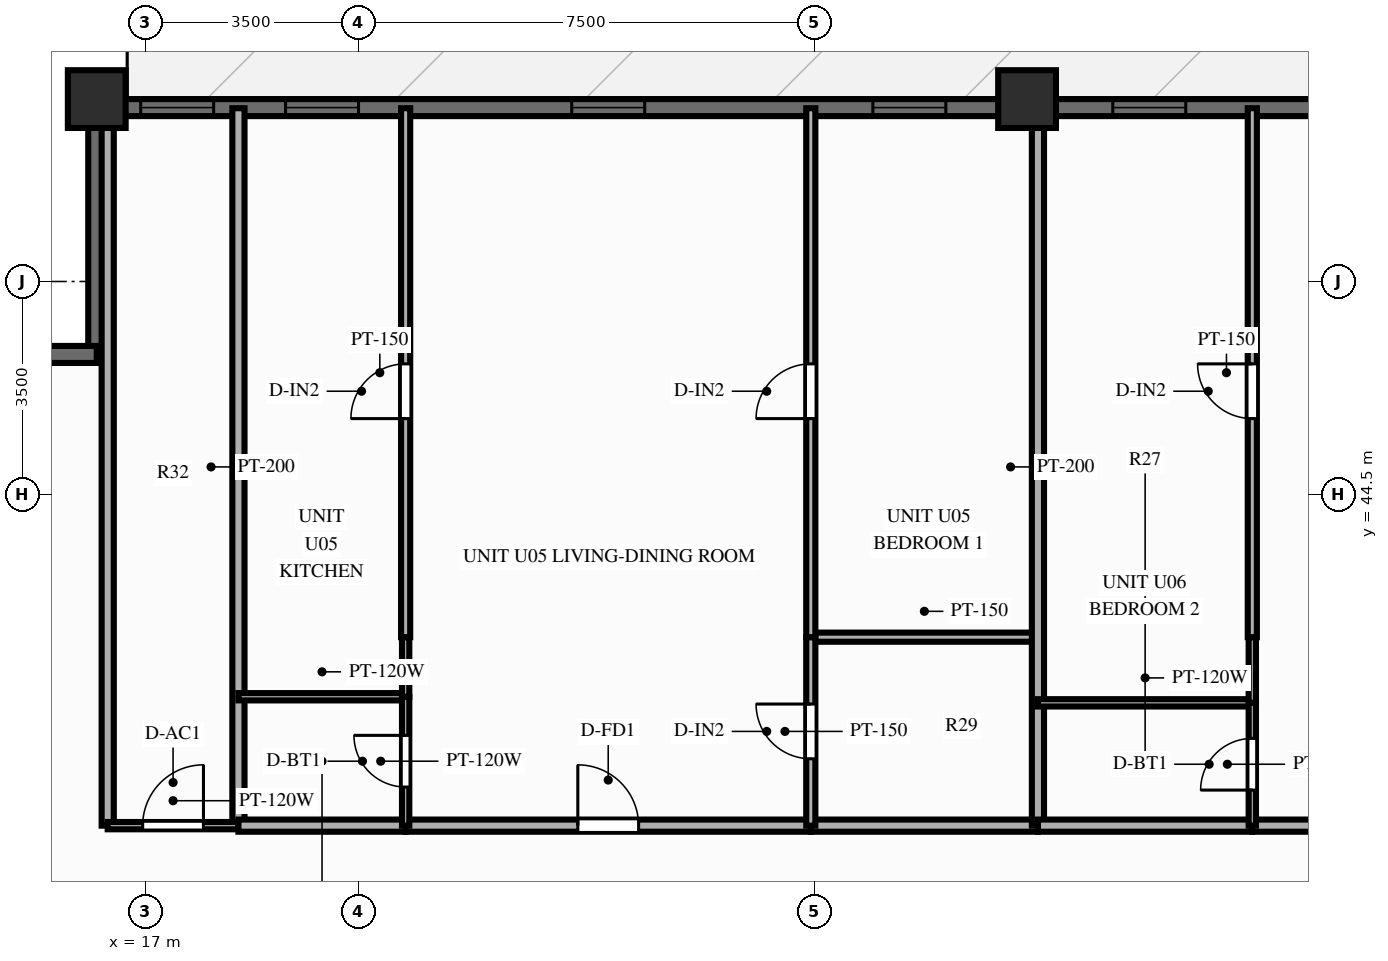
"""IFC4 building model, lengths in metres.
Left out: names, types, materials, properties, quantities, classifications, styles, units other than length and angle.
Written with IfcOpenShell. Run it as: python <this file> out.ifc"""

import sys

from ifc_helpers import new_model, si_unit, direction, frame, frame_2d, origin, origin_2d, place, context, subcontext, project, spatial, rectangle, extrude, source, transform, mapped, element, fill, save


model = new_model("IFC4")
c1 = context("Model", 3, precision=1e-05, world=origin(), true_north=direction((0.0, 1.0)))
c2 = subcontext(c1, "Body", "Model", "MODEL_VIEW")
j1 = project(units=[si_unit("LENGTHUNIT", "METRE"), si_unit("PLANEANGLEUNIT", "RADIAN")], contexts=[c1])
p1 = place(None, origin())
s1 = spatial("IfcSite", under=j1, at=p1, CompositionType="ELEMENT")
p2 = place(p1, origin())
s2 = spatial("IfcBuilding", under=s1, at=p2, CompositionType="ELEMENT")
p3 = place(p2, frame((0.0, 0.0, 77.85)))
s3 = spatial("IfcBuildingStorey", under=s2, at=p3, CompositionType="ELEMENT", Elevation=77.85)
m1 = source(origin(), c2, "Body", "SweptSolid", [
    extrude(rectangle(XDim=0.95, YDim=0.95, at=origin_2d()), origin(), (0.0, 0.0, 1.0), 3.0),
])
for number, where, z_axis, x_axis in (
    (1, (31.5, 51.0, 0.0), (0.0, 0.0, 1.0), (1.0, 0.0, 0.0)),
    (2, (16.2, 51.0, 0.0), (0.0, 0.0, 1.0), (1.0, 0.0, 0.0)),
):
    element("IfcColumn", number, at=place(p3, frame(where, z_axis=z_axis, x_axis=x_axis)), inside=s3, PredefinedType="COLUMN", context=c2, shape_type="MappedRepresentation", body=[
        mapped(m1, transform((0.0, 0.0, 0.0), scale=1.0)),
    ])
p4 = place(p3, frame((16.2, 50.86, 0.0), z_axis=(0.0, 0.0, 1.0), x_axis=(1.0, 0.0, 0.0)))
e3 = element("IfcWall", 3, at=p4, inside=s3, PredefinedType="SOLIDWALL", context=c2, shape_type="SweptSolid", body=[
    extrude(rectangle(XDim=43.6, YDim=0.28, at=frame_2d((21.8, 0.0))), origin(), (0.0, 0.0, 1.0), 2.28),
])
p5 = place(p4, frame((0.722, 0.0, 0.25)))
e4 = element("IfcOpeningElement", 4, at=p5, cuts=e3, PredefinedType="OPENING", context=c2, shape_type="SweptSolid", body=[
    extrude(rectangle(XDim=1.2, YDim=1.5, at=frame_2d((0.6, 0.75))), frame((0.0, 0.152, 0.0), z_axis=(0.0, -1.0, 0.0), x_axis=(1.0, 0.0, 0.0)), (0.0, 0.0, 1.0), 0.304),
])
p6 = place(p4, frame((3.105, 0.0, 0.25)))
e5 = element("IfcOpeningElement", 5, at=p6, cuts=e3, PredefinedType="OPENING", context=c2, shape_type="SweptSolid", body=[
    extrude(rectangle(XDim=1.2, YDim=1.5, at=frame_2d((0.6, 0.75))), frame((0.0, 0.152, 0.0), z_axis=(0.0, -1.0, 0.0), x_axis=(1.0, 0.0, 0.0)), (0.0, 0.0, 1.0), 0.304),
])
p7 = place(p4, frame((7.812, 0.0, 0.25)))
e6 = element("IfcOpeningElement", 6, at=p7, cuts=e3, PredefinedType="OPENING", context=c2, shape_type="SweptSolid", body=[
    extrude(rectangle(XDim=1.2, YDim=1.5, at=frame_2d((0.6, 0.75))), frame((0.0, 0.152, 0.0), z_axis=(0.0, -1.0, 0.0), x_axis=(1.0, 0.0, 0.0)), (0.0, 0.0, 1.0), 0.304),
])
p8 = place(p4, frame((12.764, 0.0, 0.25)))
e7 = element("IfcOpeningElement", 7, at=p8, cuts=e3, PredefinedType="OPENING", context=c2, shape_type="SweptSolid", body=[
    extrude(rectangle(XDim=1.2, YDim=1.5, at=frame_2d((0.6, 0.75))), frame((0.0, 0.152, 0.0), z_axis=(0.0, -1.0, 0.0), x_axis=(1.0, 0.0, 0.0)), (0.0, 0.0, 1.0), 0.304),
])
p9 = place(p4, frame((16.71, 0.0, 0.25)))
e8 = element("IfcOpeningElement", 8, at=p9, cuts=e3, PredefinedType="OPENING", context=c2, shape_type="SweptSolid", body=[
    extrude(rectangle(XDim=1.2, YDim=1.5, at=frame_2d((0.6, 0.75))), frame((0.0, 0.152, 0.0), z_axis=(0.0, -1.0, 0.0), x_axis=(1.0, 0.0, 0.0)), (0.0, 0.0, 1.0), 0.304),
])
p10 = place(p4, frame((21.604, 0.0, 0.0)))
e9 = element("IfcOpeningElement", 9, at=p10, cuts=e3, PredefinedType="OPENING", context=c2, shape_type="SweptSolid", body=[
    extrude(rectangle(XDim=1.1, YDim=2.15, at=frame_2d((0.55, 1.075))), frame((0.0, 0.152, 0.0), z_axis=(0.0, -1.0, 0.0), x_axis=(1.0, 0.0, 0.0)), (0.0, 0.0, 1.0), 0.304),
])
p11 = place(p4, frame((26.044, 0.0, 0.25)))
e10 = element("IfcOpeningElement", 10, at=p11, cuts=e3, PredefinedType="OPENING", context=c2, shape_type="SweptSolid", body=[
    extrude(rectangle(XDim=1.2, YDim=1.5, at=frame_2d((0.6, 0.75))), frame((0.0, 0.152, 0.0), z_axis=(0.0, -1.0, 0.0), x_axis=(1.0, 0.0, 0.0)), (0.0, 0.0, 1.0), 0.304),
])
p12 = place(p4, frame((30.306, 0.0, 0.25)))
e11 = element("IfcOpeningElement", 11, at=p12, cuts=e3, PredefinedType="OPENING", context=c2, shape_type="SweptSolid", body=[
    extrude(rectangle(XDim=1.2, YDim=1.5, at=frame_2d((0.6, 0.75))), frame((0.0, 0.152, 0.0), z_axis=(0.0, -1.0, 0.0), x_axis=(1.0, 0.0, 0.0)), (0.0, 0.0, 1.0), 0.304),
])
p13 = place(p4, frame((35.629, 0.0, 0.25)))
e12 = element("IfcOpeningElement", 12, at=p13, cuts=e3, PredefinedType="OPENING", context=c2, shape_type="SweptSolid", body=[
    extrude(rectangle(XDim=1.2, YDim=1.5, at=frame_2d((0.6, 0.75))), frame((0.0, 0.152, 0.0), z_axis=(0.0, -1.0, 0.0), x_axis=(1.0, 0.0, 0.0)), (0.0, 0.0, 1.0), 0.304),
])
p14 = place(p4, frame((40.885, 0.0, 0.25)))
e13 = element("IfcOpeningElement", 13, at=p14, cuts=e3, PredefinedType="OPENING", context=c2, shape_type="SweptSolid", body=[
    extrude(rectangle(XDim=1.2, YDim=1.5, at=frame_2d((0.6, 0.75))), frame((0.0, 0.152, 0.0), z_axis=(0.0, -1.0, 0.0), x_axis=(1.0, 0.0, 0.0)), (0.0, 0.0, 1.0), 0.304),
])
for number, where, z_axis, x_axis in (
    (14, (16.2, 46.8, 0.0), (0.0, 0.0, 1.0), (0.0, 1.0, 0.0)),
    (15, (12.08, 46.8, 0.0), (0.0, 0.0, 1.0), (1.0, 0.0, 0.0)),
):
    element("IfcWall", number, at=place(p3, frame(where, z_axis=z_axis, x_axis=x_axis)), inside=s3, PredefinedType="SOLIDWALL", context=c2, shape_type="SweptSolid", body=[
        extrude(rectangle(XDim=4.12, YDim=0.28, at=frame_2d((2.06, 0.0))), origin(), (0.0, 0.0, 1.0), 2.28),
    ])
for number, where, z_axis, x_axis in (
    (16, (16.38, 39.05, 0.0), (0.0, 0.0, 1.0), (0.0, 1.0, 0.0)),
    (17, (18.53, 39.05, 0.0), (0.0, 0.0, 1.0), (0.0, 1.0, 0.0)),
):
    element("IfcWall", number, at=place(p3, frame(where, z_axis=z_axis, x_axis=x_axis)), inside=s3, PredefinedType="PARTITIONING", context=c2, shape_type="SweptSolid", body=[
        extrude(rectangle(XDim=11.8, YDim=0.2, at=frame_2d((5.9, 0.0))), origin(), (0.0, 0.0, 1.0), 2.79),
    ])
p15 = place(p3, frame((16.38, 39.05, 0.0), z_axis=(0.0, 0.0, 1.0), x_axis=(1.0, 0.0, 0.0)))
e18 = element("IfcWall", 18, at=p15, inside=s3, PredefinedType="PARTITIONING", context=c2, shape_type="SweptSolid", body=[
    extrude(rectangle(XDim=2.15, YDim=0.12, at=frame_2d((1.075, 0.0))), origin(), (0.0, 0.0, 1.0), 2.79),
])
p16 = place(p15, frame((0.575, 0.0, 0.0)))
e19 = element("IfcOpeningElement", 19, at=p16, cuts=e18, PredefinedType="OPENING", context=c2, shape_type="SweptSolid", body=[
    extrude(rectangle(XDim=1.0, YDim=2.1, at=frame_2d((0.5, 1.05))), frame((0.0, 0.072, 0.0), z_axis=(0.0, -1.0, 0.0), x_axis=(1.0, 0.0, 0.0)), (0.0, 0.0, 1.0), 0.144),
])
p17 = place(p3, frame((18.53, 39.05, 0.0), z_axis=(0.0, 0.0, 1.0), x_axis=(1.0, 0.0, 0.0)))
e20 = element("IfcWall", 20, at=p17, inside=s3, PredefinedType="PARTITIONING", context=c2, shape_type="SweptSolid", body=[
    extrude(rectangle(XDim=2.75, YDim=0.2, at=frame_2d((1.375, 0.0))), origin(), (0.0, 0.0, 1.0), 2.79),
])
p18 = place(p3, frame((21.28, 39.05, 0.0), z_axis=(0.0, 0.0, 1.0), x_axis=(1.0, 0.0, 0.0)))
e21 = element("IfcWall", 21, at=p18, inside=s3, PredefinedType="PARTITIONING", context=c2, shape_type="SweptSolid", body=[
    extrude(rectangle(XDim=6.663, YDim=0.2, at=frame_2d((3.332, 0.0))), origin(), (0.0, 0.0, 1.0), 2.79),
])
p19 = place(p18, frame((2.832, 0.0, 0.0)))
e22 = element("IfcOpeningElement", 22, at=p19, cuts=e21, PredefinedType="OPENING", context=c2, shape_type="SweptSolid", body=[
    extrude(rectangle(XDim=1.0, YDim=2.15, at=frame_2d((0.5, 1.075))), frame((0.0, 0.112, 0.0), z_axis=(0.0, -1.0, 0.0), x_axis=(1.0, 0.0, 0.0)), (0.0, 0.0, 1.0), 0.224),
])
p20 = place(p3, frame((27.943, 39.05, 0.0), z_axis=(0.0, 0.0, 1.0), x_axis=(1.0, 0.0, 0.0)))
e23 = element("IfcWall", 23, at=p20, inside=s3, PredefinedType="PARTITIONING", context=c2, shape_type="SweptSolid", body=[
    extrude(rectangle(XDim=3.736, YDim=0.2, at=frame_2d((1.868, 0.0))), origin(), (0.0, 0.0, 1.0), 2.79),
])
p21 = place(p3, frame((18.53, 41.17, 0.0), z_axis=(0.0, 0.0, 1.0), x_axis=(1.0, 0.0, 0.0)))
e24 = element("IfcWall", 24, at=p21, inside=s3, PredefinedType="PARTITIONING", context=c2, shape_type="SweptSolid", body=[
    extrude(rectangle(XDim=2.75, YDim=0.12, at=frame_2d((1.375, 0.0))), origin(), (0.0, 0.0, 1.0), 2.79),
])
p22 = place(p3, frame((27.943, 42.15, 0.0), z_axis=(0.0, 0.0, 1.0), x_axis=(1.0, 0.0, 0.0)))
e25 = element("IfcWall", 25, at=p22, inside=s3, PredefinedType="PARTITIONING", context=c2, shape_type="SweptSolid", body=[
    extrude(rectangle(XDim=3.736, YDim=0.15, at=frame_2d((1.868, 0.0))), origin(), (0.0, 0.0, 1.0), 2.79),
])
p23 = place(p3, frame((21.28, 39.05, 0.0), z_axis=(0.0, 0.0, 1.0), x_axis=(0.0, 1.0, 0.0)))
e26 = element("IfcWall", 26, at=p23, inside=s3, PredefinedType="PARTITIONING", context=c2, shape_type="SweptSolid", body=[
    extrude(rectangle(XDim=2.12, YDim=0.12, at=frame_2d((1.06, 0.0))), origin(), (0.0, 0.0, 1.0), 2.79),
])
p24 = place(p23, frame((0.635, 0.0, 0.0)))
e27 = element("IfcOpeningElement", 27, at=p24, cuts=e26, PredefinedType="OPENING", context=c2, shape_type="SweptSolid", body=[
    extrude(rectangle(XDim=0.85, YDim=2.05, at=frame_2d((0.425, 1.025))), frame((0.0, 0.072, 0.0), z_axis=(0.0, -1.0, 0.0), x_axis=(1.0, 0.0, 0.0)), (0.0, 0.0, 1.0), 0.144),
])
p25 = place(p3, frame((21.28, 41.17, 0.0), z_axis=(0.0, 0.0, 1.0), x_axis=(0.0, 1.0, 0.0)))
e28 = element("IfcWall", 28, at=p25, inside=s3, PredefinedType="PARTITIONING", context=c2, shape_type="SweptSolid", body=[
    extrude(rectangle(XDim=0.98, YDim=0.12, at=frame_2d((0.49, 0.0))), origin(), (0.0, 0.0, 1.0), 2.79),
])
p26 = place(p3, frame((21.28, 42.15, 0.0), z_axis=(0.0, 0.0, 1.0), x_axis=(0.0, 1.0, 0.0)))
e29 = element("IfcWall", 29, at=p26, inside=s3, PredefinedType="PARTITIONING", context=c2, shape_type="SweptSolid", body=[
    extrude(rectangle(XDim=8.7, YDim=0.15, at=frame_2d((4.35, 0.0))), origin(), (0.0, 0.0, 1.0), 2.79),
])
p27 = place(p26, frame((3.595, 0.0, 0.0)))
e30 = element("IfcOpeningElement", 30, at=p27, cuts=e29, PredefinedType="OPENING", context=c2, shape_type="SweptSolid", body=[
    extrude(rectangle(XDim=0.9, YDim=2.1, at=frame_2d((0.45, 1.05))), frame((0.0, 0.087, 0.0), z_axis=(0.0, -1.0, 0.0), x_axis=(1.0, 0.0, 0.0)), (0.0, 0.0, 1.0), 0.174),
])
p28 = place(p3, frame((27.943, 39.05, 0.0), z_axis=(0.0, 0.0, 1.0), x_axis=(0.0, 1.0, 0.0)))
e31 = element("IfcWall", 31, at=p28, inside=s3, PredefinedType="PARTITIONING", context=c2, shape_type="SweptSolid", body=[
    extrude(rectangle(XDim=3.1, YDim=0.15, at=frame_2d((1.55, 0.0))), origin(), (0.0, 0.0, 1.0), 2.79),
])
p29 = place(p28, frame((1.1, 0.0, 0.0)))
e32 = element("IfcOpeningElement", 32, at=p29, cuts=e31, PredefinedType="OPENING", context=c2, shape_type="SweptSolid", body=[
    extrude(rectangle(XDim=0.9, YDim=2.1, at=frame_2d((0.45, 1.05))), frame((0.0, 0.087, 0.0), z_axis=(0.0, -1.0, 0.0), x_axis=(1.0, 0.0, 0.0)), (0.0, 0.0, 1.0), 0.174),
])
p30 = place(p3, frame((27.943, 42.15, 0.0), z_axis=(0.0, 0.0, 1.0), x_axis=(0.0, 1.0, 0.0)))
e33 = element("IfcWall", 33, at=p30, inside=s3, PredefinedType="PARTITIONING", context=c2, shape_type="SweptSolid", body=[
    extrude(rectangle(XDim=8.7, YDim=0.15, at=frame_2d((4.35, 0.0))), origin(), (0.0, 0.0, 1.0), 2.79),
])
p31 = place(p30, frame((3.595, 0.0, 0.0)))
e34 = element("IfcOpeningElement", 34, at=p31, cuts=e33, PredefinedType="OPENING", context=c2, shape_type="SweptSolid", body=[
    extrude(rectangle(XDim=0.9, YDim=2.1, at=frame_2d((0.45, 1.05))), frame((0.0, 0.087, 0.0), z_axis=(0.0, -1.0, 0.0), x_axis=(1.0, 0.0, 0.0)), (0.0, 0.0, 1.0), 0.174),
])
p32 = place(p3, frame((31.679, 39.05, 0.0), z_axis=(0.0, 0.0, 1.0), x_axis=(0.0, 1.0, 0.0)))
e35 = element("IfcWall", 35, at=p32, inside=s3, PredefinedType="PARTITIONING", context=c2, shape_type="SweptSolid", body=[
    extrude(rectangle(XDim=11.8, YDim=0.2, at=frame_2d((5.9, 0.0))), origin(), (0.0, 0.0, 1.0), 2.79),
])
p33 = place(p3, frame((31.679, 39.05, 0.0), z_axis=(0.0, 0.0, 1.0), x_axis=(1.0, 0.0, 0.0)))
e36 = element("IfcWall", 36, at=p33, inside=s3, PredefinedType="PARTITIONING", context=c2, shape_type="SweptSolid", body=[
    extrude(rectangle(XDim=3.526, YDim=0.2, at=frame_2d((1.763, 0.0))), origin(), (0.0, 0.0, 1.0), 2.79),
])
p34 = place(p3, frame((35.204, 39.05, 0.0), z_axis=(0.0, 0.0, 1.0), x_axis=(1.0, 0.0, 0.0)))
e37 = element("IfcWall", 37, at=p34, inside=s3, PredefinedType="PARTITIONING", context=c2, shape_type="SweptSolid", body=[
    extrude(rectangle(XDim=6.299, YDim=0.2, at=frame_2d((3.149, 0.0))), origin(), (0.0, 0.0, 1.0), 2.79),
])
p35 = place(p34, frame((2.649, 0.0, 0.0)))
e38 = element("IfcOpeningElement", 38, at=p35, cuts=e37, PredefinedType="OPENING", context=c2, shape_type="SweptSolid", body=[
    extrude(rectangle(XDim=1.0, YDim=2.15, at=frame_2d((0.5, 1.075))), frame((0.0, 0.112, 0.0), z_axis=(0.0, -1.0, 0.0), x_axis=(1.0, 0.0, 0.0)), (0.0, 0.0, 1.0), 0.224),
])
p36 = place(p3, frame((31.679, 41.07, 0.0), z_axis=(0.0, 0.0, 1.0), x_axis=(1.0, 0.0, 0.0)))
e39 = element("IfcWall", 39, at=p36, inside=s3, PredefinedType="PARTITIONING", context=c2, shape_type="SweptSolid", body=[
    extrude(rectangle(XDim=3.526, YDim=0.12, at=frame_2d((1.763, 0.0))), origin(), (0.0, 0.0, 1.0), 2.79),
])
p37 = place(p3, frame((35.204, 39.05, 0.0), z_axis=(0.0, 0.0, 1.0), x_axis=(0.0, 1.0, 0.0)))
e40 = element("IfcWall", 40, at=p37, inside=s3, PredefinedType="PARTITIONING", context=c2, shape_type="SweptSolid", body=[
    extrude(rectangle(XDim=2.02, YDim=0.12, at=frame_2d((1.01, 0.0))), origin(), (0.0, 0.0, 1.0), 2.79),
])
p38 = place(p37, frame((0.585, 0.0, 0.0)))
e41 = element("IfcOpeningElement", 41, at=p38, cuts=e40, PredefinedType="OPENING", context=c2, shape_type="SweptSolid", body=[
    extrude(rectangle(XDim=0.85, YDim=2.05, at=frame_2d((0.425, 1.025))), frame((0.0, 0.072, 0.0), z_axis=(0.0, -1.0, 0.0), x_axis=(1.0, 0.0, 0.0)), (0.0, 0.0, 1.0), 0.144),
])
p39 = place(p3, frame((35.204, 41.07, 0.0), z_axis=(0.0, 0.0, 1.0), x_axis=(0.0, 1.0, 0.0)))
e42 = element("IfcWall", 42, at=p39, inside=s3, PredefinedType="PARTITIONING", context=c2, shape_type="SweptSolid", body=[
    extrude(rectangle(XDim=1.08, YDim=0.12, at=frame_2d((0.54, 0.0))), origin(), (0.0, 0.0, 1.0), 2.79),
])
p40 = place(p3, frame((35.204, 42.15, 0.0), z_axis=(0.0, 0.0, 1.0), x_axis=(0.0, 1.0, 0.0)))
e43 = element("IfcWall", 43, at=p40, inside=s3, PredefinedType="PARTITIONING", context=c2, shape_type="SweptSolid", body=[
    extrude(rectangle(XDim=8.7, YDim=0.15, at=frame_2d((4.35, 0.0))), origin(), (0.0, 0.0, 1.0), 2.79),
])
p41 = place(p40, frame((3.595, 0.0, 0.0)))
e44 = element("IfcOpeningElement", 44, at=p41, cuts=e43, PredefinedType="OPENING", context=c2, shape_type="SweptSolid", body=[
    extrude(rectangle(XDim=0.9, YDim=2.1, at=frame_2d((0.45, 1.05))), frame((0.0, 0.087, 0.0), z_axis=(0.0, -1.0, 0.0), x_axis=(1.0, 0.0, 0.0)), (0.0, 0.0, 1.0), 0.174),
])
m2 = source(origin(), c2, "Body", "SweptSolid", [
    extrude(rectangle(XDim=1.2, YDim=1.5, at=frame_2d((0.6, 0.75))), frame((0.0, 0.03, 0.0), z_axis=(0.0, -1.0, 0.0), x_axis=(1.0, 0.0, 0.0)), (0.0, 0.0, 1.0), 0.06),
])
p42 = place(p5, origin())
e45 = element("IfcWindow", 45, at=p42, inside=s3, PartitioningType="SINGLE_PANEL", PredefinedType="WINDOW", context=c2, shape_type="MappedRepresentation", body=[
    mapped(m2, transform((0.0, 0.0, 0.0), scale=1.0)),
])
fill(e4, e45)
p43 = place(p6, origin())
e46 = element("IfcWindow", 46, at=p43, inside=s3, PartitioningType="SINGLE_PANEL", PredefinedType="WINDOW", context=c2, shape_type="MappedRepresentation", body=[
    mapped(m2, transform((0.0, 0.0, 0.0), scale=1.0)),
])
fill(e5, e46)
p44 = place(p7, origin())
e47 = element("IfcWindow", 47, at=p44, inside=s3, PartitioningType="SINGLE_PANEL", PredefinedType="WINDOW", context=c2, shape_type="MappedRepresentation", body=[
    mapped(m2, transform((0.0, 0.0, 0.0), scale=1.0)),
])
fill(e6, e47)
p45 = place(p8, origin())
e48 = element("IfcWindow", 48, at=p45, inside=s3, PartitioningType="SINGLE_PANEL", PredefinedType="WINDOW", context=c2, shape_type="MappedRepresentation", body=[
    mapped(m2, transform((0.0, 0.0, 0.0), scale=1.0)),
])
fill(e7, e48)
p46 = place(p9, origin())
e49 = element("IfcWindow", 49, at=p46, inside=s3, PartitioningType="SINGLE_PANEL", PredefinedType="WINDOW", context=c2, shape_type="MappedRepresentation", body=[
    mapped(m2, transform((0.0, 0.0, 0.0), scale=1.0)),
])
fill(e8, e49)
m3 = source(origin(), c2, "Body", "SweptSolid", [
    extrude(rectangle(XDim=1.0, YDim=2.1, at=frame_2d((0.5, 1.05))), frame((0.0, 0.025, 0.0), z_axis=(0.0, -1.0, 0.0), x_axis=(1.0, 0.0, 0.0)), (0.0, 0.0, 1.0), 0.05),
])
p47 = place(p16, origin())
e50 = element("IfcDoor", 50, at=p47, inside=s3, OperationType="SINGLE_SWING_RIGHT", PredefinedType="DOOR", context=c2, shape_type="MappedRepresentation", body=[
    mapped(m3, transform((0.0, 0.0, 0.0), scale=1.0)),
])
fill(e19, e50)
m4 = source(origin(), c2, "Body", "SweptSolid", [
    extrude(rectangle(XDim=1.0, YDim=2.15, at=frame_2d((0.5, 1.075))), frame((0.0, 0.025, 0.0), z_axis=(0.0, -1.0, 0.0), x_axis=(1.0, 0.0, 0.0)), (0.0, 0.0, 1.0), 0.05),
])
p48 = place(p19, origin())
e51 = element("IfcDoor", 51, at=p48, inside=s3, OperationType="SINGLE_SWING_LEFT", PredefinedType="DOOR", context=c2, shape_type="MappedRepresentation", body=[
    mapped(m4, transform((0.0, 0.0, 0.0), scale=1.0)),
])
fill(e22, e51)
m5 = source(origin(), c2, "Body", "SweptSolid", [
    extrude(rectangle(XDim=0.85, YDim=2.05, at=frame_2d((0.425, 1.025))), frame((0.0, 0.025, 0.0), z_axis=(0.0, -1.0, 0.0), x_axis=(1.0, 0.0, 0.0)), (0.0, 0.0, 1.0), 0.05),
])
p49 = place(p24, origin())
e52 = element("IfcDoor", 52, at=p49, inside=s3, OperationType="SINGLE_SWING_RIGHT", PredefinedType="DOOR", context=c2, shape_type="MappedRepresentation", body=[
    mapped(m5, transform((0.0, 0.0, 0.0), scale=1.0)),
])
fill(e27, e52)
m6 = source(origin(), c2, "Body", "SweptSolid", [
    extrude(rectangle(XDim=0.9, YDim=2.1, at=frame_2d((0.45, 1.05))), frame((0.0, 0.025, 0.0), z_axis=(0.0, -1.0, 0.0), x_axis=(1.0, 0.0, 0.0)), (0.0, 0.0, 1.0), 0.05),
])
p50 = place(p27, origin())
e53 = element("IfcDoor", 53, at=p50, inside=s3, OperationType="SINGLE_SWING_LEFT", PredefinedType="DOOR", context=c2, shape_type="MappedRepresentation", body=[
    mapped(m6, transform((0.0, 0.0, 0.0), scale=1.0)),
])
fill(e30, e53)
p51 = place(p29, origin())
e54 = element("IfcDoor", 54, at=p51, inside=s3, OperationType="SINGLE_SWING_RIGHT", PredefinedType="DOOR", context=c2, shape_type="MappedRepresentation", body=[
    mapped(m6, transform((0.0, 0.0, 0.0), scale=1.0)),
])
fill(e32, e54)
p52 = place(p31, origin())
e55 = element("IfcDoor", 55, at=p52, inside=s3, OperationType="SINGLE_SWING_LEFT", PredefinedType="DOOR", context=c2, shape_type="MappedRepresentation", body=[
    mapped(m6, transform((0.0, 0.0, 0.0), scale=1.0)),
])
fill(e34, e55)
p53 = place(p38, origin())
e56 = element("IfcDoor", 56, at=p53, inside=s3, OperationType="SINGLE_SWING_LEFT", PredefinedType="DOOR", context=c2, shape_type="MappedRepresentation", body=[
    mapped(m5, transform((0.0, 0.0, 0.0), scale=1.0)),
])
fill(e41, e56)
p54 = place(p41, origin())
e57 = element("IfcDoor", 57, at=p54, inside=s3, OperationType="SINGLE_SWING_RIGHT", PredefinedType="DOOR", context=c2, shape_type="MappedRepresentation", body=[
    mapped(m6, transform((0.0, 0.0, 0.0), scale=1.0)),
])
fill(e44, e57)
save(model, sys.argv[1])
